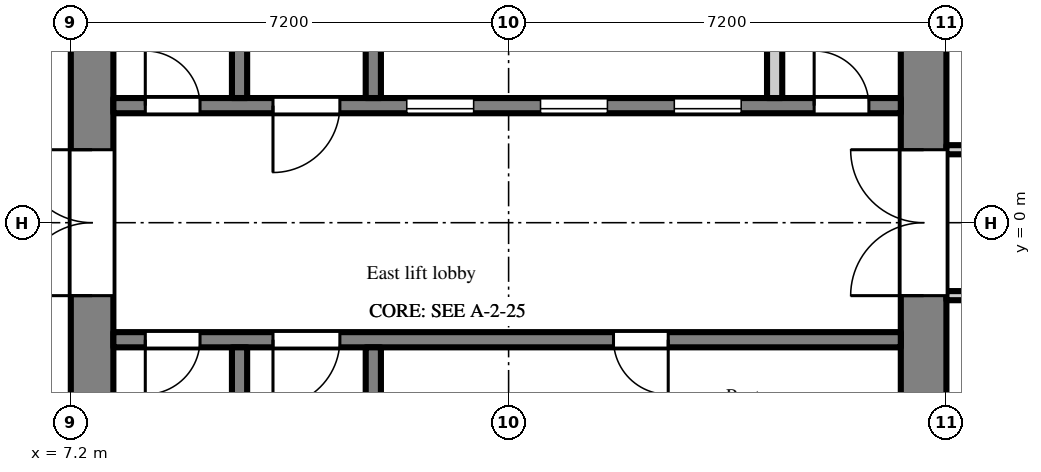
"""IFC4 building model, lengths in metres.
Left out: names, types, materials, properties, quantities, classifications, styles, units other than length and angle.
Written with IfcOpenShell. Run it as: python <this file> out.ifc"""

import sys

from ifc_helpers import new_model, si_unit, direction, frame, frame_2d, origin, place, context, subcontext, project, spatial, rectangle, extrude, element, fill, save


model = new_model("IFC4")
c1 = context("Model", 3, precision=1e-05, world=origin(), true_north=direction((0.0, 1.0)))
c2 = subcontext(c1, "Body", "Model", "MODEL_VIEW")
j1 = project(units=[si_unit("LENGTHUNIT", "METRE"), si_unit("PLANEANGLEUNIT", "RADIAN")], contexts=[c1])
p1 = place(None, origin())
s1 = spatial("IfcSite", under=j1, at=p1, CompositionType="ELEMENT")
p2 = place(p1, origin())
s2 = spatial("IfcBuilding", under=s1, at=p2, CompositionType="ELEMENT")
p3 = place(p2, frame((0.0, 0.0, 156.3)))
s3 = spatial("IfcBuildingStorey", under=s2, at=p3, CompositionType="ELEMENT", Elevation=156.3)
p4 = place(p3, frame((7.55, -7.2, 0.0), z_axis=(0.0, 0.0, 1.0), x_axis=(0.0, 1.0, 0.0)))
e1 = element("IfcWall", 1, at=p4, inside=s3, PredefinedType="SHEAR", context=c2, shape_type="SweptSolid", body=[
    extrude(rectangle(XDim=14.4, YDim=0.7, at=frame_2d((7.2, 0.0))), origin(), (0.0, 0.0, 1.0), 2.6),
])
p5 = place(p4, frame((6.0, 0.0, 0.0)))
e2 = element("IfcOpeningElement", 2, at=p5, cuts=e1, PredefinedType="OPENING", context=c2, shape_type="SweptSolid", body=[
    extrude(rectangle(XDim=2.4, YDim=2.2, at=frame_2d((1.2, 1.1))), frame((0.0, 0.36, 0.0), z_axis=(0.0, -1.0, 0.0), x_axis=(1.0, 0.0, 0.0)), (0.0, 0.0, 1.0), 0.72),
])
p6 = place(p3, frame((21.225, -7.2, 0.0), z_axis=(0.0, 0.0, 1.0), x_axis=(0.0, 1.0, 0.0)))
e3 = element("IfcWall", 3, at=p6, inside=s3, PredefinedType="SHEAR", context=c2, shape_type="SweptSolid", body=[
    extrude(rectangle(XDim=14.4, YDim=0.75, at=frame_2d((7.2, 0.0))), origin(), (0.0, 0.0, 1.0), 2.6),
])
p7 = place(p6, frame((6.0, 0.0, 0.0)))
e4 = element("IfcOpeningElement", 4, at=p7, cuts=e3, PredefinedType="OPENING", context=c2, shape_type="SweptSolid", body=[
    extrude(rectangle(XDim=2.4, YDim=2.2, at=frame_2d((1.2, 1.1))), frame((0.0, 0.385, 0.0), z_axis=(0.0, -1.0, 0.0), x_axis=(1.0, 0.0, 0.0)), (0.0, 0.0, 1.0), 0.77),
])
p8 = place(p3, frame((7.9, 1.925, 0.0), z_axis=(0.0, 0.0, 1.0), x_axis=(1.0, 0.0, 0.0)))
e5 = element("IfcWall", 5, at=p8, inside=s3, PredefinedType="SHEAR", context=c2, shape_type="SweptSolid", body=[
    extrude(rectangle(XDim=12.95, YDim=0.25, at=frame_2d((6.475, 0.0))), origin(), (0.0, 0.0, 1.0), 2.6),
])
p9 = place(p8, frame((4.825, 0.0, 0.0)))
e6 = element("IfcOpeningElement", 6, at=p9, cuts=e5, PredefinedType="OPENING", context=c2, shape_type="SweptSolid", body=[
    extrude(rectangle(XDim=1.1, YDim=2.1, at=frame_2d((0.55, 1.05))), frame((0.0, 0.135, 0.0), z_axis=(0.0, -1.0, 0.0), x_axis=(1.0, 0.0, 0.0)), (0.0, 0.0, 1.0), 0.27),
])
p10 = place(p8, frame((7.025, 0.0, 0.0)))
e7 = element("IfcOpeningElement", 7, at=p10, cuts=e5, PredefinedType="OPENING", context=c2, shape_type="SweptSolid", body=[
    extrude(rectangle(XDim=1.1, YDim=2.1, at=frame_2d((0.55, 1.05))), frame((0.0, 0.135, 0.0), z_axis=(0.0, -1.0, 0.0), x_axis=(1.0, 0.0, 0.0)), (0.0, 0.0, 1.0), 0.27),
])
p11 = place(p8, frame((9.225, 0.0, 0.0)))
e8 = element("IfcOpeningElement", 8, at=p11, cuts=e5, PredefinedType="OPENING", context=c2, shape_type="SweptSolid", body=[
    extrude(rectangle(XDim=1.1, YDim=2.1, at=frame_2d((0.55, 1.05))), frame((0.0, 0.135, 0.0), z_axis=(0.0, -1.0, 0.0), x_axis=(1.0, 0.0, 0.0)), (0.0, 0.0, 1.0), 0.27),
])
p12 = place(p8, frame((0.525, 0.0, 0.0)))
e9 = element("IfcOpeningElement", 9, at=p12, cuts=e5, PredefinedType="OPENING", context=c2, shape_type="SweptSolid", body=[
    extrude(rectangle(XDim=0.9, YDim=2.1, at=frame_2d((0.45, 1.05))), frame((0.0, 0.135, 0.0), z_axis=(0.0, -1.0, 0.0), x_axis=(1.0, 0.0, 0.0)), (0.0, 0.0, 1.0), 0.27),
])
p13 = place(p8, frame((2.625, 0.0, 0.0)))
e10 = element("IfcOpeningElement", 10, at=p13, cuts=e5, PredefinedType="OPENING", context=c2, shape_type="SweptSolid", body=[
    extrude(rectangle(XDim=1.1, YDim=2.1, at=frame_2d((0.55, 1.05))), frame((0.0, 0.135, 0.0), z_axis=(0.0, -1.0, 0.0), x_axis=(1.0, 0.0, 0.0)), (0.0, 0.0, 1.0), 0.27),
])
p14 = place(p8, frame((11.525, 0.0, 0.0)))
e11 = element("IfcOpeningElement", 11, at=p14, cuts=e5, PredefinedType="OPENING", context=c2, shape_type="SweptSolid", body=[
    extrude(rectangle(XDim=0.9, YDim=2.1, at=frame_2d((0.45, 1.05))), frame((0.0, 0.135, 0.0), z_axis=(0.0, -1.0, 0.0), x_axis=(1.0, 0.0, 0.0)), (0.0, 0.0, 1.0), 0.27),
])
p15 = place(p3, frame((9.975, 2.05, 0.0), z_axis=(0.0, 0.0, 1.0), x_axis=(0.0, 1.0, 0.0)))
e12 = element("IfcWall", 12, at=p15, inside=s3, PredefinedType="SHEAR", context=c2, shape_type="SweptSolid", body=[
    extrude(rectangle(XDim=4.7, YDim=0.25, at=frame_2d((2.35, 0.0))), origin(), (0.0, 0.0, 1.0), 2.6),
])
p16 = place(p15, frame((2.95, 0.0, 0.0)))
e13 = element("IfcOpeningElement", 13, at=p16, cuts=e12, PredefinedType="OPENING", context=c2, shape_type="SweptSolid", body=[
    extrude(rectangle(XDim=1.1, YDim=2.1, at=frame_2d((0.55, 1.05))), frame((0.0, 0.135, 0.0), z_axis=(0.0, -1.0, 0.0), x_axis=(1.0, 0.0, 0.0)), (0.0, 0.0, 1.0), 0.27),
])
p17 = place(p3, frame((12.175, 2.05, 0.0), z_axis=(0.0, 0.0, 1.0), x_axis=(0.0, 1.0, 0.0)))
e14 = element("IfcWall", 14, at=p17, inside=s3, PredefinedType="SHEAR", context=c2, shape_type="SweptSolid", body=[
    extrude(rectangle(XDim=4.7, YDim=0.25, at=frame_2d((2.35, 0.0))), origin(), (0.0, 0.0, 1.0), 2.6),
])
p18 = place(p17, frame((2.975, 0.0, 0.0)))
e15 = element("IfcOpeningElement", 15, at=p18, cuts=e14, PredefinedType="OPENING", context=c2, shape_type="SweptSolid", body=[
    extrude(rectangle(XDim=1.1, YDim=2.1, at=frame_2d((0.55, 1.05))), frame((0.0, 0.135, 0.0), z_axis=(0.0, -1.0, 0.0), x_axis=(1.0, 0.0, 0.0)), (0.0, 0.0, 1.0), 0.27),
])
p19 = place(p3, frame((18.775, 2.05, 0.0), z_axis=(0.0, 0.0, 1.0), x_axis=(0.0, 1.0, 0.0)))
e16 = element("IfcWall", 16, at=p19, inside=s3, PredefinedType="PARTITIONING", context=c2, shape_type="SweptSolid", body=[
    extrude(rectangle(XDim=2.1, YDim=0.25, at=frame_2d((1.05, 0.0))), origin(), (0.0, 0.0, 1.0), 2.6),
])
p20 = place(p3, frame((7.9, -1.925, 0.0), z_axis=(0.0, 0.0, 1.0), x_axis=(1.0, 0.0, 0.0)))
e17 = element("IfcWall", 17, at=p20, inside=s3, PredefinedType="SHEAR", context=c2, shape_type="SweptSolid", body=[
    extrude(rectangle(XDim=12.95, YDim=0.25, at=frame_2d((6.475, 0.0))), origin(), (0.0, 0.0, 1.0), 2.6),
])
p21 = place(p20, frame((0.525, 0.0, 0.0)))
e18 = element("IfcOpeningElement", 18, at=p21, cuts=e17, PredefinedType="OPENING", context=c2, shape_type="SweptSolid", body=[
    extrude(rectangle(XDim=0.9, YDim=2.1, at=frame_2d((0.45, 1.05))), frame((0.0, 0.135, 0.0), z_axis=(0.0, -1.0, 0.0), x_axis=(1.0, 0.0, 0.0)), (0.0, 0.0, 1.0), 0.27),
])
p22 = place(p20, frame((2.625, 0.0, 0.0)))
e19 = element("IfcOpeningElement", 19, at=p22, cuts=e17, PredefinedType="OPENING", context=c2, shape_type="SweptSolid", body=[
    extrude(rectangle(XDim=1.1, YDim=2.1, at=frame_2d((0.55, 1.05))), frame((0.0, 0.135, 0.0), z_axis=(0.0, -1.0, 0.0), x_axis=(1.0, 0.0, 0.0)), (0.0, 0.0, 1.0), 0.27),
])
p23 = place(p20, frame((8.225, 0.0, 0.0)))
e20 = element("IfcOpeningElement", 20, at=p23, cuts=e17, PredefinedType="OPENING", context=c2, shape_type="SweptSolid", body=[
    extrude(rectangle(XDim=0.9, YDim=2.1, at=frame_2d((0.45, 1.05))), frame((0.0, 0.135, 0.0), z_axis=(0.0, -1.0, 0.0), x_axis=(1.0, 0.0, 0.0)), (0.0, 0.0, 1.0), 0.27),
])
p24 = place(p3, frame((9.975, -2.05, 0.0), z_axis=(0.0, 0.0, 1.0), x_axis=(0.0, -1.0, 0.0)))
e21 = element("IfcWall", 21, at=p24, inside=s3, PredefinedType="SHEAR", context=c2, shape_type="SweptSolid", body=[
    extrude(rectangle(XDim=4.7, YDim=0.25, at=frame_2d((2.35, 0.0))), origin(), (0.0, 0.0, 1.0), 2.6),
])
p25 = place(p24, frame((2.95, 0.0, 0.0)))
e22 = element("IfcOpeningElement", 22, at=p25, cuts=e21, PredefinedType="OPENING", context=c2, shape_type="SweptSolid", body=[
    extrude(rectangle(XDim=1.1, YDim=2.1, at=frame_2d((0.55, 1.05))), frame((0.0, 0.135, 0.0), z_axis=(0.0, -1.0, 0.0), x_axis=(1.0, 0.0, 0.0)), (0.0, 0.0, 1.0), 0.27),
])
p26 = place(p3, frame((12.175, -2.05, 0.0), z_axis=(0.0, 0.0, 1.0), x_axis=(0.0, -1.0, 0.0)))
e23 = element("IfcWall", 23, at=p26, inside=s3, PredefinedType="SHEAR", context=c2, shape_type="SweptSolid", body=[
    extrude(rectangle(XDim=4.7, YDim=0.25, at=frame_2d((2.35, 0.0))), origin(), (0.0, 0.0, 1.0), 2.6),
])
p27 = place(p26, frame((2.975, 0.0, 0.0)))
e24 = element("IfcOpeningElement", 24, at=p27, cuts=e23, PredefinedType="OPENING", context=c2, shape_type="SweptSolid", body=[
    extrude(rectangle(XDim=1.1, YDim=2.1, at=frame_2d((0.55, 1.05))), frame((0.0, 0.135, 0.0), z_axis=(0.0, -1.0, 0.0), x_axis=(1.0, 0.0, 0.0)), (0.0, 0.0, 1.0), 0.27),
])
p28 = place(p3, frame((21.6, -1.2, 0.0), z_axis=(0.0, 0.0, 1.0), x_axis=(1.0, 0.0, 0.0)))
e25 = element("IfcWall", 25, at=p28, inside=s3, PredefinedType="PARTITIONING", context=c2, shape_type="SweptSolid", body=[
    extrude(rectangle(XDim=14.9, YDim=0.15, at=frame_2d((7.45, 0.0))), origin(), (0.0, 0.0, 1.0), 2.6),
])
p29 = place(p28, frame((3.8, 0.0, 0.0)))
e26 = element("IfcOpeningElement", 26, at=p29, cuts=e25, PredefinedType="OPENING", context=c2, shape_type="SweptSolid", body=[
    extrude(rectangle(XDim=1.0, YDim=2.1, at=frame_2d((0.5, 1.05))), frame((0.0, 0.085, 0.0), z_axis=(0.0, -1.0, 0.0), x_axis=(1.0, 0.0, 0.0)), (0.0, 0.0, 1.0), 0.17),
])
p30 = place(p28, frame((7.65, 0.0, 0.0)))
e27 = element("IfcOpeningElement", 27, at=p30, cuts=e25, PredefinedType="OPENING", context=c2, shape_type="SweptSolid", body=[
    extrude(rectangle(XDim=0.9, YDim=2.1, at=frame_2d((0.45, 1.05))), frame((0.0, 0.085, 0.0), z_axis=(0.0, -1.0, 0.0), x_axis=(1.0, 0.0, 0.0)), (0.0, 0.0, 1.0), 0.17),
])
p31 = place(p28, frame((9.45, 0.0, 0.0)))
e28 = element("IfcOpeningElement", 28, at=p31, cuts=e25, PredefinedType="OPENING", context=c2, shape_type="SweptSolid", body=[
    extrude(rectangle(XDim=0.9, YDim=2.1, at=frame_2d((0.45, 1.05))), frame((0.0, 0.085, 0.0), z_axis=(0.0, -1.0, 0.0), x_axis=(1.0, 0.0, 0.0)), (0.0, 0.0, 1.0), 0.17),
])
p32 = place(p28, frame((11.95, 0.0, 0.0)))
e29 = element("IfcOpeningElement", 29, at=p32, cuts=e25, PredefinedType="OPENING", context=c2, shape_type="SweptSolid", body=[
    extrude(rectangle(XDim=1.8, YDim=2.1, at=frame_2d((0.9, 1.05))), frame((0.0, 0.085, 0.0), z_axis=(0.0, -1.0, 0.0), x_axis=(1.0, 0.0, 0.0)), (0.0, 0.0, 1.0), 0.17),
])
p33 = place(p3, frame((21.6, 1.2, 0.0), z_axis=(0.0, 0.0, 1.0), x_axis=(1.0, 0.0, 0.0)))
e30 = element("IfcWall", 30, at=p33, inside=s3, PredefinedType="PARTITIONING", context=c2, shape_type="SweptSolid", body=[
    extrude(rectangle(XDim=14.9, YDim=0.15, at=frame_2d((7.45, 0.0))), origin(), (0.0, 0.0, 1.0), 2.6),
])
p34 = place(p33, frame((2.7, 0.0, 0.0)))
e31 = element("IfcOpeningElement", 31, at=p34, cuts=e30, PredefinedType="OPENING", context=c2, shape_type="SweptSolid", body=[
    extrude(rectangle(XDim=1.8, YDim=2.1, at=frame_2d((0.9, 1.05))), frame((0.0, 0.085, 0.0), z_axis=(0.0, -1.0, 0.0), x_axis=(1.0, 0.0, 0.0)), (0.0, 0.0, 1.0), 0.17),
])
p35 = place(p33, frame((9.6, 0.0, 0.0)))
e32 = element("IfcOpeningElement", 32, at=p35, cuts=e30, PredefinedType="OPENING", context=c2, shape_type="SweptSolid", body=[
    extrude(rectangle(XDim=1.0, YDim=2.1, at=frame_2d((0.5, 1.05))), frame((0.0, 0.085, 0.0), z_axis=(0.0, -1.0, 0.0), x_axis=(1.0, 0.0, 0.0)), (0.0, 0.0, 1.0), 0.17),
])
p36 = place(p33, frame((11.95, 0.0, 0.0)))
e33 = element("IfcOpeningElement", 33, at=p36, cuts=e30, PredefinedType="OPENING", context=c2, shape_type="SweptSolid", body=[
    extrude(rectangle(XDim=1.8, YDim=2.1, at=frame_2d((0.9, 1.05))), frame((0.0, 0.085, 0.0), z_axis=(0.0, -1.0, 0.0), x_axis=(1.0, 0.0, 0.0)), (0.0, 0.0, 1.0), 0.17),
])
p37 = place(p9, origin())
e34 = element("IfcDoor", 34, at=p37, inside=s3, OperationType="SLIDING_TO_LEFT", PredefinedType="DOOR", context=c2, shape_type="SweptSolid", body=[
    extrude(rectangle(XDim=1.1, YDim=2.1, at=frame_2d((0.55, 1.05))), frame((0.0, 0.025, 0.0), z_axis=(0.0, -1.0, 0.0), x_axis=(1.0, 0.0, 0.0)), (0.0, 0.0, 1.0), 0.05),
])
fill(e6, e34)
p38 = place(p10, origin())
e35 = element("IfcDoor", 35, at=p38, inside=s3, OperationType="SLIDING_TO_LEFT", PredefinedType="DOOR", context=c2, shape_type="SweptSolid", body=[
    extrude(rectangle(XDim=1.1, YDim=2.1, at=frame_2d((0.55, 1.05))), frame((0.0, 0.025, 0.0), z_axis=(0.0, -1.0, 0.0), x_axis=(1.0, 0.0, 0.0)), (0.0, 0.0, 1.0), 0.05),
])
fill(e7, e35)
p39 = place(p11, origin())
e36 = element("IfcDoor", 36, at=p39, inside=s3, OperationType="SLIDING_TO_LEFT", PredefinedType="DOOR", context=c2, shape_type="SweptSolid", body=[
    extrude(rectangle(XDim=1.1, YDim=2.1, at=frame_2d((0.55, 1.05))), frame((0.0, 0.025, 0.0), z_axis=(0.0, -1.0, 0.0), x_axis=(1.0, 0.0, 0.0)), (0.0, 0.0, 1.0), 0.05),
])
fill(e8, e36)
p40 = place(p12, origin())
e37 = element("IfcDoor", 37, at=p40, inside=s3, OperationType="SINGLE_SWING_LEFT", PredefinedType="DOOR", context=c2, shape_type="SweptSolid", body=[
    extrude(rectangle(XDim=0.9, YDim=2.1, at=frame_2d((0.45, 1.05))), frame((0.0, 0.025, 0.0), z_axis=(0.0, -1.0, 0.0), x_axis=(1.0, 0.0, 0.0)), (0.0, 0.0, 1.0), 0.05),
])
fill(e9, e37)
p41 = place(p21, frame((0.9, 0.0, 0.0), z_axis=(0.0, 0.0, 1.0), x_axis=(-1.0, 0.0, 0.0)))
e38 = element("IfcDoor", 38, at=p41, inside=s3, OperationType="SINGLE_SWING_RIGHT", PredefinedType="DOOR", context=c2, shape_type="SweptSolid", body=[
    extrude(rectangle(XDim=0.9, YDim=2.1, at=frame_2d((0.45, 1.05))), frame((0.0, 0.025, 0.0), z_axis=(0.0, -1.0, 0.0), x_axis=(1.0, 0.0, 0.0)), (0.0, 0.0, 1.0), 0.05),
])
fill(e18, e38)
p42 = place(p13, frame((1.1, 0.0, 0.0), z_axis=(0.0, 0.0, 1.0), x_axis=(-1.0, 0.0, 0.0)))
e39 = element("IfcDoor", 39, at=p42, inside=s3, OperationType="SINGLE_SWING_RIGHT", PredefinedType="DOOR", context=c2, shape_type="SweptSolid", body=[
    extrude(rectangle(XDim=1.1, YDim=2.1, at=frame_2d((0.55, 1.05))), frame((0.0, 0.025, 0.0), z_axis=(0.0, -1.0, 0.0), x_axis=(1.0, 0.0, 0.0)), (0.0, 0.0, 1.0), 0.05),
])
fill(e10, e39)
p43 = place(p22, frame((1.1, 0.0, 0.0), z_axis=(0.0, 0.0, 1.0), x_axis=(-1.0, 0.0, 0.0)))
e40 = element("IfcDoor", 40, at=p43, inside=s3, OperationType="SINGLE_SWING_RIGHT", PredefinedType="DOOR", context=c2, shape_type="SweptSolid", body=[
    extrude(rectangle(XDim=1.1, YDim=2.1, at=frame_2d((0.55, 1.05))), frame((0.0, 0.025, 0.0), z_axis=(0.0, -1.0, 0.0), x_axis=(1.0, 0.0, 0.0)), (0.0, 0.0, 1.0), 0.05),
])
fill(e19, e40)
p44 = place(p5, origin())
e41 = element("IfcDoor", 41, at=p44, inside=s3, OperationType="DOUBLE_DOOR_DOUBLE_SWING", PredefinedType="DOOR", context=c2, shape_type="SweptSolid", body=[
    extrude(rectangle(XDim=2.4, YDim=2.2, at=frame_2d((1.2, 1.1))), frame((0.0, 0.025, 0.0), z_axis=(0.0, -1.0, 0.0), x_axis=(1.0, 0.0, 0.0)), (0.0, 0.0, 1.0), 0.05),
])
fill(e2, e41)
p45 = place(p7, origin())
e42 = element("IfcDoor", 42, at=p45, inside=s3, OperationType="DOUBLE_DOOR_DOUBLE_SWING", PredefinedType="DOOR", context=c2, shape_type="SweptSolid", body=[
    extrude(rectangle(XDim=2.4, YDim=2.2, at=frame_2d((1.2, 1.1))), frame((0.0, 0.025, 0.0), z_axis=(0.0, -1.0, 0.0), x_axis=(1.0, 0.0, 0.0)), (0.0, 0.0, 1.0), 0.05),
])
fill(e4, e42)
p46 = place(p14, origin())
e43 = element("IfcDoor", 43, at=p46, inside=s3, OperationType="SINGLE_SWING_LEFT", PredefinedType="DOOR", context=c2, shape_type="SweptSolid", body=[
    extrude(rectangle(XDim=0.9, YDim=2.1, at=frame_2d((0.45, 1.05))), frame((0.0, 0.025, 0.0), z_axis=(0.0, -1.0, 0.0), x_axis=(1.0, 0.0, 0.0)), (0.0, 0.0, 1.0), 0.05),
])
fill(e11, e43)
p47 = place(p23, frame((0.9, 0.0, 0.0), z_axis=(0.0, 0.0, 1.0), x_axis=(-1.0, 0.0, 0.0)))
e44 = element("IfcDoor", 44, at=p47, inside=s3, OperationType="SINGLE_SWING_LEFT", PredefinedType="DOOR", context=c2, shape_type="SweptSolid", body=[
    extrude(rectangle(XDim=0.9, YDim=2.1, at=frame_2d((0.45, 1.05))), frame((0.0, 0.025, 0.0), z_axis=(0.0, -1.0, 0.0), x_axis=(1.0, 0.0, 0.0)), (0.0, 0.0, 1.0), 0.05),
])
fill(e20, e44)
save(model, sys.argv[1])
